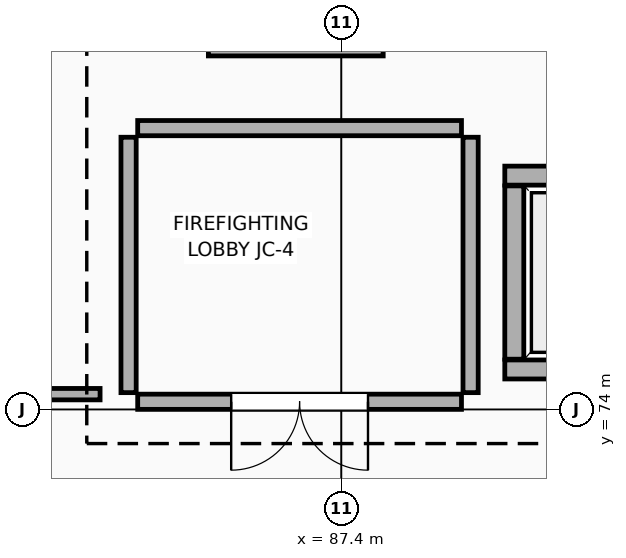
"""IFC4 building model, lengths in metres.
Left out: names, types, materials, properties, quantities, classifications, styles, units other than length and angle.
Written with IfcOpenShell. Run it as: python <this file> out.ifc"""

import sys

from ifc_helpers import new_model, si_unit, direction, frame, frame_2d, origin, place, context, subcontext, project, spatial, rectangle, extrude, element, fill, save


model = new_model("IFC4")
c1 = context("Model", 3, precision=1e-05, world=origin(), true_north=direction((0.0, 1.0)))
c2 = subcontext(c1, "Body", "Model", "MODEL_VIEW")
j1 = project(units=[si_unit("LENGTHUNIT", "METRE"), si_unit("PLANEANGLEUNIT", "RADIAN")], contexts=[c1])
p1 = place(None, origin())
s1 = spatial("IfcSite", under=j1, at=p1, CompositionType="ELEMENT")
p2 = place(p1, origin())
s2 = spatial("IfcBuilding", under=s1, at=p2, CompositionType="ELEMENT")
p3 = place(p2, frame((0.0, 0.0, 5.4)))
s3 = spatial("IfcBuildingStorey", under=s2, at=p3, CompositionType="ELEMENT", Elevation=5.4)
p4 = place(p3, frame((89.55, 74.525, 0.0), z_axis=(0.0, 0.0, 1.0), x_axis=(1.0, 0.0, 0.0)))
e1 = element("IfcWall", 1, at=p4, inside=s3, PredefinedType="STANDARD", context=c2, shape_type="SweptSolid", body=[
    extrude(rectangle(XDim=2.5, YDim=0.25, at=frame_2d((1.25, 0.0))), origin(), (0.0, 0.0, 1.0), 4.53),
])
p5 = place(p4, frame((0.65, 0.0, 0.0)))
e2 = element("IfcOpeningElement", 2, at=p5, cuts=e1, PredefinedType="OPENING", context=c2, shape_type="SweptSolid", body=[
    extrude(rectangle(XDim=1.2, YDim=2.05, at=frame_2d((0.6, 1.025))), frame((0.0, 0.135, 0.0), z_axis=(0.0, -1.0, 0.0), x_axis=(1.0, 0.0, 0.0)), (0.0, 0.0, 1.0), 0.27),
])
p6 = place(p3, frame((92.05, 77.075, 0.0), z_axis=(0.0, 0.0, 1.0), x_axis=(-1.0, 0.0, 0.0)))
e3 = element("IfcWall", 3, at=p6, inside=s3, PredefinedType="STANDARD", context=c2, shape_type="SweptSolid", body=[
    extrude(rectangle(XDim=2.5, YDim=0.25, at=frame_2d((1.25, 0.0))), origin(), (0.0, 0.0, 1.0), 4.53),
])
p7 = place(p3, frame((89.675, 76.94, 0.0), z_axis=(0.0, 0.0, 1.0), x_axis=(0.0, -1.0, 0.0)))
e4 = element("IfcWall", 4, at=p7, inside=s3, PredefinedType="STANDARD", context=c2, shape_type="SweptSolid", body=[
    extrude(rectangle(XDim=2.28, YDim=0.25, at=frame_2d((1.14, 0.0))), origin(), (0.0, 0.0, 1.0), 4.53),
])
p8 = place(p3, frame((85.65, 78.775, 0.0), z_axis=(0.0, 0.0, 1.0), x_axis=(1.0, 0.0, 0.0)))
e5 = element("IfcWall", 5, at=p8, inside=s3, PredefinedType="STANDARD", context=c2, shape_type="SweptSolid", body=[
    extrude(rectangle(XDim=2.3, YDim=0.25, at=frame_2d((1.15, 0.0))), origin(), (0.0, 0.0, 1.0), 4.53),
])
p9 = place(p3, frame((84.6, 74.22, 0.0), z_axis=(0.0, 0.0, 1.0), x_axis=(0.0, 1.0, 0.0)))
e6 = element("IfcWall", 6, at=p9, inside=s3, PredefinedType="PARTITIONING", context=c2, shape_type="SweptSolid", body=[
    extrude(rectangle(XDim=3.36, YDim=0.2, at=frame_2d((1.68, 0.0))), origin(), (0.0, 0.0, 1.0), 4.53),
])
p10 = place(p3, frame((84.72, 77.7, 0.0), z_axis=(0.0, 0.0, 1.0), x_axis=(1.0, 0.0, 0.0)))
e7 = element("IfcWall", 7, at=p10, inside=s3, PredefinedType="PARTITIONING", context=c2, shape_type="SweptSolid", body=[
    extrude(rectangle(XDim=4.26, YDim=0.2, at=frame_2d((2.13, 0.0))), origin(), (0.0, 0.0, 1.0), 4.53),
])
p11 = place(p3, frame((89.1, 77.58, 0.0), z_axis=(0.0, 0.0, 1.0), x_axis=(0.0, -1.0, 0.0)))
e8 = element("IfcWall", 8, at=p11, inside=s3, PredefinedType="PARTITIONING", context=c2, shape_type="SweptSolid", body=[
    extrude(rectangle(XDim=3.36, YDim=0.2, at=frame_2d((1.68, 0.0))), origin(), (0.0, 0.0, 1.0), 4.53),
])
p12 = place(p3, frame((88.98, 74.1, 0.0), z_axis=(0.0, 0.0, 1.0), x_axis=(-1.0, 0.0, 0.0)))
e9 = element("IfcWall", 9, at=p12, inside=s3, PredefinedType="PARTITIONING", context=c2, shape_type="SweptSolid", body=[
    extrude(rectangle(XDim=4.26, YDim=0.2, at=frame_2d((2.13, 0.0))), origin(), (0.0, 0.0, 1.0), 4.53),
])
p13 = place(p12, frame((1.23, 0.0, 0.0)))
e10 = element("IfcOpeningElement", 10, at=p13, cuts=e9, PredefinedType="OPENING", context=c2, shape_type="SweptSolid", body=[
    extrude(rectangle(XDim=1.8, YDim=2.15, at=frame_2d((0.9, 1.075))), frame((0.0, 0.11, 0.0), z_axis=(0.0, -1.0, 0.0), x_axis=(1.0, 0.0, 0.0)), (0.0, 0.0, 1.0), 0.22),
])
p14 = place(p3, frame((84.225, 74.2, 0.0), z_axis=(0.0, 0.0, 1.0), x_axis=(-1.0, 0.0, 0.0)))
e11 = element("IfcWall", 11, at=p14, inside=s3, PredefinedType="PARTITIONING", context=c2, shape_type="SweptSolid", body=[
    extrude(rectangle(XDim=4.485, YDim=0.15, at=frame_2d((2.243, 0.0))), origin(), (0.0, 0.0, 1.0), 4.53),
])
p15 = place(p13, origin())
e12 = element("IfcDoor", 12, at=p15, inside=s3, OperationType="DOUBLE_DOOR_SINGLE_SWING", PredefinedType="DOOR", context=c2, shape_type="SweptSolid", body=[
    extrude(rectangle(XDim=1.8, YDim=2.15, at=frame_2d((0.9, 1.075))), frame((0.0, 0.025, 0.0), z_axis=(0.0, -1.0, 0.0), x_axis=(1.0, 0.0, 0.0)), (0.0, 0.0, 1.0), 0.05),
])
fill(e10, e12)
save(model, sys.argv[1])
